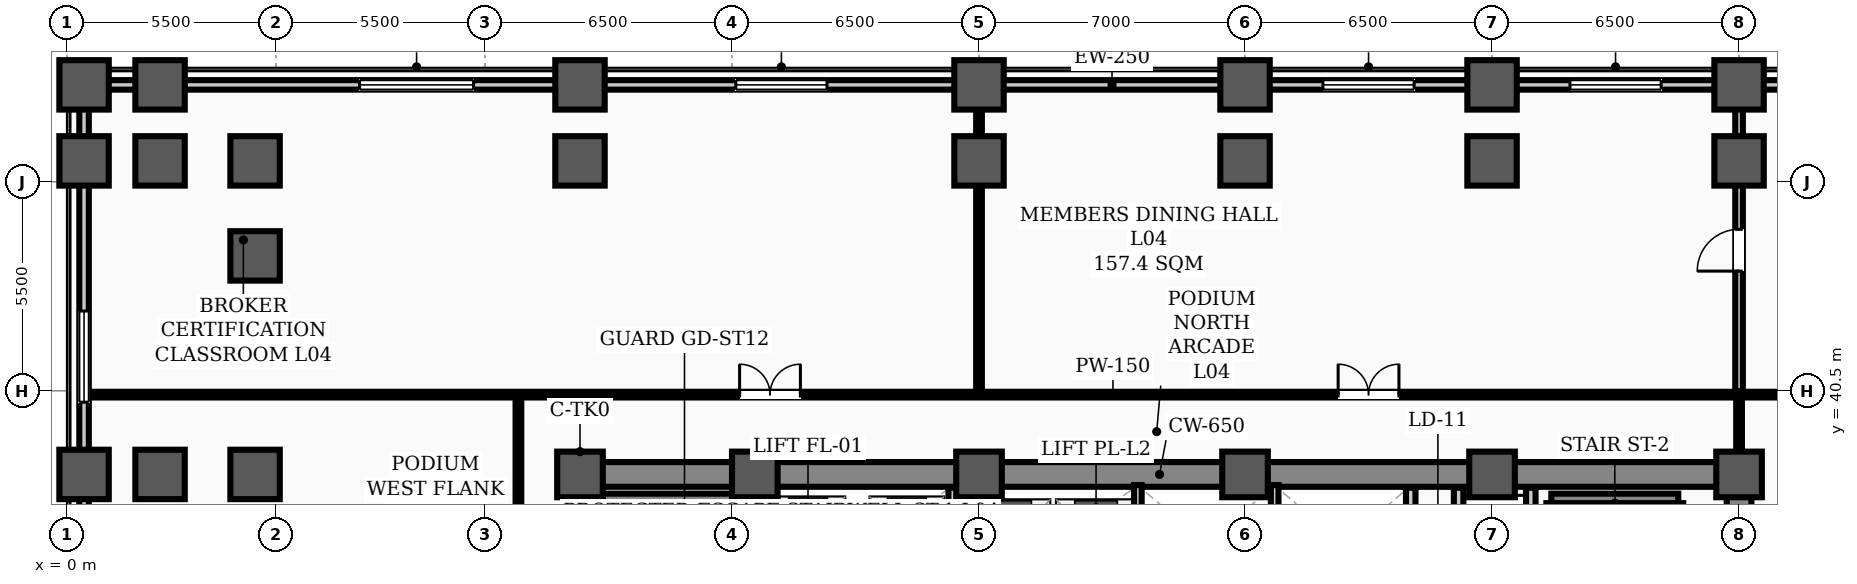
"""IFC4 building model, lengths in metres.
Left out: names, types, materials, properties, quantities, classifications, styles, units other than length and angle.
Written with IfcOpenShell. Run it as: python <this file> out.ifc"""

import sys

from ifc_helpers import new_model, si_unit, direction, frame, frame_2d, origin, origin_2d, place, context, subcontext, project, spatial, rectangle, hollow_rectangle, extrude, element, fill, save


model = new_model("IFC4")
c1 = context("Model", 3, precision=1e-05, world=origin(), true_north=direction((0.0, 1.0)))
c2 = subcontext(c1, "Body", "Model", "MODEL_VIEW")
j1 = project(units=[si_unit("LENGTHUNIT", "METRE"), si_unit("PLANEANGLEUNIT", "RADIAN")], contexts=[c1])
p1 = place(None, origin())
s1 = spatial("IfcSite", under=j1, at=p1, CompositionType="ELEMENT")
p2 = place(p1, origin())
s2 = spatial("IfcBuilding", under=s1, at=p2, CompositionType="ELEMENT")
p3 = place(p2, frame((0.0, 0.0, 16.6)))
s3 = spatial("IfcBuildingStorey", under=s2, at=p3, CompositionType="ELEMENT", Elevation=16.6)
for number, where, z_axis, x_axis in (
    (1, (13.5, 38.3, 0.0), (0.0, 0.0, 1.0), (1.0, 0.0, 0.0)),
    (2, (18.1, 38.3, 0.0), (0.0, 0.0, 1.0), (1.0, 0.0, 0.0)),
    (3, (24.0, 38.3, 0.0), (0.0, 0.0, 1.0), (1.0, 0.0, 0.0)),
    (4, (31.0, 38.3, 0.0), (0.0, 0.0, 1.0), (1.0, 0.0, 0.0)),
    (5, (37.5, 38.3, 0.0), (0.0, 0.0, 1.0), (1.0, 0.0, 0.0)),
    (6, (44.0, 38.3, 0.0), (0.0, 0.0, 1.0), (1.0, 0.0, 0.0)),
):
    element("IfcColumn", number, at=place(p3, frame(where, z_axis=z_axis, x_axis=x_axis)), inside=s3, PredefinedType="COLUMN", context=c2, shape_type="SweptSolid", body=[
        extrude(hollow_rectangle(XDim=1.2, YDim=1.2, WallThickness=0.04, InnerFilletRadius=0.02, OuterFilletRadius=0.06, at=origin_2d()), origin(), (0.0, 0.0, 1.0), 5.4),
    ])
for number, where, z_axis, x_axis in (
    (7, (0.45, 38.3, 0.0), (0.0, 0.0, 1.0), (1.0, 0.0, 0.0)),
    (8, (0.45, 46.55, 0.0), (0.0, 0.0, 1.0), (1.0, 0.0, 0.0)),
    (9, (0.45, 48.55, 0.0), (0.0, 0.0, 1.0), (1.0, 0.0, 0.0)),
):
    element("IfcColumn", number, at=place(p3, frame(where, z_axis=z_axis, x_axis=x_axis)), inside=s3, PredefinedType="COLUMN", context=c2, shape_type="SweptSolid", body=[
        extrude(rectangle(XDim=1.3, YDim=1.3, at=origin_2d()), origin(), (0.0, 0.0, 1.0), 5.16),
    ])
for number, where, z_axis, x_axis in (
    (10, (2.45, 38.3, 0.0), (0.0, 0.0, 1.0), (1.0, 0.0, 0.0)),
    (11, (2.45, 46.55, 0.0), (0.0, 0.0, 1.0), (1.0, 0.0, 0.0)),
):
    element("IfcColumn", number, at=place(p3, frame(where, z_axis=z_axis, x_axis=x_axis)), inside=s3, PredefinedType="COLUMN", context=c2, shape_type="SweptSolid", body=[
        extrude(rectangle(XDim=1.3, YDim=1.3, at=origin_2d()), origin(), (0.0, 0.0, 1.0), 5.4),
    ])
p4 = place(p3, frame((2.45, 48.55, 0.0), z_axis=(0.0, 0.0, 1.0), x_axis=(1.0, 0.0, 0.0)))
e12 = element("IfcColumn", 12, at=p4, inside=s3, PredefinedType="COLUMN", context=c2, shape_type="SweptSolid", body=[
    extrude(rectangle(XDim=1.3, YDim=1.3, at=origin_2d()), origin(), (0.0, 0.0, 1.0), 5.16),
])
for number, where, z_axis, x_axis in (
    (13, (4.95, 38.3, 0.0), (0.0, 0.0, 1.0), (1.0, 0.0, 0.0)),
    (14, (4.95, 44.05, 0.0), (0.0, 0.0, 1.0), (1.0, 0.0, 0.0)),
    (15, (4.95, 46.55, 0.0), (0.0, 0.0, 1.0), (1.0, 0.0, 0.0)),
    (16, (13.5, 46.55, 0.0), (0.0, 0.0, 1.0), (1.0, 0.0, 0.0)),
):
    element("IfcColumn", number, at=place(p3, frame(where, z_axis=z_axis, x_axis=x_axis)), inside=s3, PredefinedType="COLUMN", context=c2, shape_type="SweptSolid", body=[
        extrude(rectangle(XDim=1.3, YDim=1.3, at=origin_2d()), origin(), (0.0, 0.0, 1.0), 5.4),
    ])
p5 = place(p3, frame((13.5, 48.55, 0.0), z_axis=(0.0, 0.0, 1.0), x_axis=(1.0, 0.0, 0.0)))
e17 = element("IfcColumn", 17, at=p5, inside=s3, PredefinedType="COLUMN", context=c2, shape_type="SweptSolid", body=[
    extrude(rectangle(XDim=1.3, YDim=1.3, at=origin_2d()), origin(), (0.0, 0.0, 1.0), 5.16),
])
p6 = place(p3, frame((24.0, 46.55, 0.0), z_axis=(0.0, 0.0, 1.0), x_axis=(1.0, 0.0, 0.0)))
e18 = element("IfcColumn", 18, at=p6, inside=s3, PredefinedType="COLUMN", context=c2, shape_type="SweptSolid", body=[
    extrude(rectangle(XDim=1.3, YDim=1.3, at=origin_2d()), origin(), (0.0, 0.0, 1.0), 5.4),
])
p7 = place(p3, frame((24.0, 48.55, 0.0), z_axis=(0.0, 0.0, 1.0), x_axis=(1.0, 0.0, 0.0)))
e19 = element("IfcColumn", 19, at=p7, inside=s3, PredefinedType="COLUMN", context=c2, shape_type="SweptSolid", body=[
    extrude(rectangle(XDim=1.3, YDim=1.3, at=origin_2d()), origin(), (0.0, 0.0, 1.0), 5.16),
])
p8 = place(p3, frame((31.0, 46.55, 0.0), z_axis=(0.0, 0.0, 1.0), x_axis=(1.0, 0.0, 0.0)))
e20 = element("IfcColumn", 20, at=p8, inside=s3, PredefinedType="COLUMN", context=c2, shape_type="SweptSolid", body=[
    extrude(rectangle(XDim=1.3, YDim=1.3, at=origin_2d()), origin(), (0.0, 0.0, 1.0), 5.4),
])
p9 = place(p3, frame((31.0, 48.55, 0.0), z_axis=(0.0, 0.0, 1.0), x_axis=(1.0, 0.0, 0.0)))
e21 = element("IfcColumn", 21, at=p9, inside=s3, PredefinedType="COLUMN", context=c2, shape_type="SweptSolid", body=[
    extrude(rectangle(XDim=1.3, YDim=1.3, at=origin_2d()), origin(), (0.0, 0.0, 1.0), 5.16),
])
p10 = place(p3, frame((37.5, 46.55, 0.0), z_axis=(0.0, 0.0, 1.0), x_axis=(1.0, 0.0, 0.0)))
e22 = element("IfcColumn", 22, at=p10, inside=s3, PredefinedType="COLUMN", context=c2, shape_type="SweptSolid", body=[
    extrude(rectangle(XDim=1.3, YDim=1.3, at=origin_2d()), origin(), (0.0, 0.0, 1.0), 5.4),
])
p11 = place(p3, frame((37.5, 48.55, 0.0), z_axis=(0.0, 0.0, 1.0), x_axis=(1.0, 0.0, 0.0)))
e23 = element("IfcColumn", 23, at=p11, inside=s3, PredefinedType="COLUMN", context=c2, shape_type="SweptSolid", body=[
    extrude(rectangle(XDim=1.3, YDim=1.3, at=origin_2d()), origin(), (0.0, 0.0, 1.0), 5.16),
])
p12 = place(p3, frame((44.0, 46.55, 0.0), z_axis=(0.0, 0.0, 1.0), x_axis=(1.0, 0.0, 0.0)))
e24 = element("IfcColumn", 24, at=p12, inside=s3, PredefinedType="COLUMN", context=c2, shape_type="SweptSolid", body=[
    extrude(rectangle(XDim=1.3, YDim=1.3, at=origin_2d()), origin(), (0.0, 0.0, 1.0), 5.4),
])
p13 = place(p3, frame((44.0, 48.55, 0.0), z_axis=(0.0, 0.0, 1.0), x_axis=(1.0, 0.0, 0.0)))
e25 = element("IfcColumn", 25, at=p13, inside=s3, PredefinedType="COLUMN", context=c2, shape_type="SweptSolid", body=[
    extrude(rectangle(XDim=1.3, YDim=1.3, at=origin_2d()), origin(), (0.0, 0.0, 1.0), 5.16),
])
p14 = place(p3, frame((0.45, 48.55, 0.0), z_axis=(0.0, 0.0, 1.0), x_axis=(1.0, 0.0, 0.0)))
e26 = element("IfcWall", 26, at=p14, inside=s3, PredefinedType="STANDARD", context=c2, shape_type="SweptSolid", body=[
    extrude(rectangle(XDim=54.1, YDim=0.25, at=frame_2d((27.05, 0.0))), origin(), (0.0, 0.0, 1.0), 4.38),
])
p15 = place(p14, frame((7.25, 0.0, 0.9)))
e27 = element("IfcOpeningElement", 27, at=p15, cuts=e26, PredefinedType="OPENING", context=c2, shape_type="SweptSolid", body=[
    extrude(rectangle(XDim=3.0, YDim=2.2, at=frame_2d((1.5, 1.1))), frame((0.0, 0.135, 0.0), z_axis=(0.0, -1.0, 0.0), x_axis=(1.0, 0.0, 0.0)), (0.0, 0.0, 1.0), 0.27),
])
p16 = place(p14, frame((17.15, 0.0, 0.9)))
e28 = element("IfcOpeningElement", 28, at=p16, cuts=e26, PredefinedType="OPENING", context=c2, shape_type="SweptSolid", body=[
    extrude(rectangle(XDim=2.4, YDim=2.1, at=frame_2d((1.2, 1.05))), frame((0.0, 0.135, 0.0), z_axis=(0.0, -1.0, 0.0), x_axis=(1.0, 0.0, 0.0)), (0.0, 0.0, 1.0), 0.27),
])
p17 = place(p14, frame((32.6, 0.0, 0.9)))
e29 = element("IfcOpeningElement", 29, at=p17, cuts=e26, PredefinedType="OPENING", context=c2, shape_type="SweptSolid", body=[
    extrude(rectangle(XDim=2.4, YDim=2.1, at=frame_2d((1.2, 1.05))), frame((0.0, 0.135, 0.0), z_axis=(0.0, -1.0, 0.0), x_axis=(1.0, 0.0, 0.0)), (0.0, 0.0, 1.0), 0.27),
])
p18 = place(p14, frame((39.1, 0.0, 0.9)))
e30 = element("IfcOpeningElement", 30, at=p18, cuts=e26, PredefinedType="OPENING", context=c2, shape_type="SweptSolid", body=[
    extrude(rectangle(XDim=2.4, YDim=2.1, at=frame_2d((1.2, 1.05))), frame((0.0, 0.135, 0.0), z_axis=(0.0, -1.0, 0.0), x_axis=(1.0, 0.0, 0.0)), (0.0, 0.0, 1.0), 0.27),
])
p19 = place(p3, frame((0.45, 3.45, 0.0), z_axis=(0.0, 0.0, 1.0), x_axis=(0.0, 1.0, 0.0)))
e31 = element("IfcWall", 31, at=p19, inside=s3, PredefinedType="STANDARD", context=c2, shape_type="SweptSolid", body=[
    extrude(rectangle(XDim=45.1, YDim=0.25, at=frame_2d((22.55, 0.0))), origin(), (0.0, 0.0, 1.0), 4.38),
])
p20 = place(p19, frame((4.8, 0.0, 0.9)))
e32 = element("IfcOpeningElement", 32, at=p20, cuts=e31, PredefinedType="OPENING", context=c2, shape_type="SweptSolid", body=[
    extrude(rectangle(XDim=2.4, YDim=2.1, at=frame_2d((1.2, 1.05))), frame((0.0, 0.135, 0.0), z_axis=(0.0, -1.0, 0.0), x_axis=(1.0, 0.0, 0.0)), (0.0, 0.0, 1.0), 0.27),
])
p21 = place(p19, frame((19.85, 0.0, 0.9)))
e33 = element("IfcOpeningElement", 33, at=p21, cuts=e31, PredefinedType="OPENING", context=c2, shape_type="SweptSolid", body=[
    extrude(rectangle(XDim=2.4, YDim=2.1, at=frame_2d((1.2, 1.05))), frame((0.0, 0.135, 0.0), z_axis=(0.0, -1.0, 0.0), x_axis=(1.0, 0.0, 0.0)), (0.0, 0.0, 1.0), 0.27),
])
p22 = place(p19, frame((29.0, 0.0, 0.9)))
e34 = element("IfcOpeningElement", 34, at=p22, cuts=e31, PredefinedType="OPENING", context=c2, shape_type="SweptSolid", body=[
    extrude(rectangle(XDim=2.4, YDim=2.1, at=frame_2d((1.2, 1.05))), frame((0.0, 0.135, 0.0), z_axis=(0.0, -1.0, 0.0), x_axis=(1.0, 0.0, 0.0)), (0.0, 0.0, 1.0), 0.27),
])
p23 = place(p19, frame((36.75, 0.0, 0.9)))
e35 = element("IfcOpeningElement", 35, at=p23, cuts=e31, PredefinedType="OPENING", context=c2, shape_type="SweptSolid", body=[
    extrude(rectangle(XDim=2.4, YDim=2.1, at=frame_2d((1.2, 1.05))), frame((0.0, 0.135, 0.0), z_axis=(0.0, -1.0, 0.0), x_axis=(1.0, 0.0, 0.0)), (0.0, 0.0, 1.0), 0.27),
])
p24 = place(p3, frame((13.5, 38.3, 0.0), z_axis=(0.0, 0.0, 1.0), x_axis=(1.0, 0.0, 0.0)))
e36 = element("IfcWall", 36, at=p24, inside=s3, PredefinedType="SHEAR", context=c2, shape_type="SweptSolid", body=[
    extrude(rectangle(XDim=30.5, YDim=0.65, at=frame_2d((15.25, 0.0))), origin(), (0.0, 0.0, 1.0), 5.16),
])
for number, where, z_axis, x_axis in (
    (37, (13.5, 29.35, 0.0), (0.0, 0.0, 1.0), (0.0, 1.0, 0.0)),
    (38, (44.0, 29.35, 0.0), (0.0, 0.0, 1.0), (0.0, 1.0, 0.0)),
):
    element("IfcWall", number, at=place(p3, frame(where, z_axis=z_axis, x_axis=x_axis)), inside=s3, PredefinedType="SHEAR", context=c2, shape_type="SweptSolid", body=[
        extrude(rectangle(XDim=8.6, YDim=0.65, at=frame_2d((4.3, 0.0))), origin(), (0.0, 0.0, 1.0), 5.16),
    ])
p25 = place(p3, frame((14.1, 37.669, 0.0), z_axis=(0.0, 0.0, 1.0), x_axis=(1.0, 0.0, 0.0)))
e39 = element("IfcWall", 39, at=p25, inside=s3, PredefinedType="STANDARD", context=c2, shape_type="SweptSolid", body=[
    extrude(rectangle(XDim=3.67, YDim=0.25, at=frame_2d((1.835, 0.0))), origin(), (0.0, 0.0, 1.0), 5.16),
])
for number, where, z_axis, x_axis in (
    (40, (14.425, 30.36, 0.0), (0.0, 0.0, 1.0), (0.0, 1.0, 0.0)),
    (41, (17.775, 30.36, 0.0), (0.0, 0.0, 1.0), (0.0, 1.0, 0.0)),
):
    element("IfcWall", number, at=place(p3, frame(where, z_axis=z_axis, x_axis=x_axis)), inside=s3, PredefinedType="STANDARD", context=c2, shape_type="SweptSolid", body=[
        extrude(rectangle(XDim=7.184, YDim=0.25, at=frame_2d((3.592, 0.0))), origin(), (0.0, 0.0, 1.0), 5.16),
    ])
p26 = place(p3, frame((39.06, 37.669, 0.0), z_axis=(0.0, 0.0, 1.0), x_axis=(1.0, 0.0, 0.0)))
e42 = element("IfcWall", 42, at=p26, inside=s3, PredefinedType="STANDARD", context=c2, shape_type="SweptSolid", body=[
    extrude(rectangle(XDim=3.34, YDim=0.25, at=frame_2d((1.67, 0.0))), origin(), (0.0, 0.0, 1.0), 5.16),
])
for number, where, z_axis, x_axis in (
    (43, (39.055, 30.36, 0.0), (0.0, 0.0, 1.0), (0.0, 1.0, 0.0)),
    (44, (42.405, 30.36, 0.0), (0.0, 0.0, 1.0), (0.0, 1.0, 0.0)),
):
    element("IfcWall", number, at=place(p3, frame(where, z_axis=z_axis, x_axis=x_axis)), inside=s3, PredefinedType="STANDARD", context=c2, shape_type="SweptSolid", body=[
        extrude(rectangle(XDim=7.184, YDim=0.25, at=frame_2d((3.592, 0.0))), origin(), (0.0, 0.0, 1.0), 5.16),
    ])
p27 = place(p3, frame((36.62, 31.95, 0.0), z_axis=(0.0, 0.0, 1.0), x_axis=(0.0, 1.0, 0.0)))
e45 = element("IfcWall", 45, at=p27, inside=s3, PredefinedType="STANDARD", context=c2, shape_type="SweptSolid", body=[
    extrude(rectangle(XDim=6.0, YDim=0.25, at=frame_2d((3.0, 0.0))), origin(), (0.0, 0.0, 1.0), 3.74),
])
p28 = place(p27, frame((0.9, 0.0, 0.0)))
e46 = element("IfcOpeningElement", 46, at=p28, cuts=e45, PredefinedType="OPENING", context=c2, shape_type="SweptSolid", body=[
    extrude(rectangle(XDim=1.1, YDim=2.08, at=frame_2d((0.55, 1.04))), frame((0.0, 0.135, 0.0), z_axis=(0.0, -1.0, 0.0), x_axis=(1.0, 0.0, 0.0)), (0.0, 0.0, 1.0), 0.27),
])
p29 = place(p27, frame((4.0, 0.0, 0.0)))
e47 = element("IfcOpeningElement", 47, at=p29, cuts=e45, PredefinedType="OPENING", context=c2, shape_type="SweptSolid", body=[
    extrude(rectangle(XDim=1.1, YDim=2.08, at=frame_2d((0.55, 1.04))), frame((0.0, 0.135, 0.0), z_axis=(0.0, -1.0, 0.0), x_axis=(1.0, 0.0, 0.0)), (0.0, 0.0, 1.0), 0.27),
])
p30 = place(p3, frame((38.52, 31.95, 0.0), z_axis=(0.0, 0.0, 1.0), x_axis=(0.0, 1.0, 0.0)))
e48 = element("IfcWall", 48, at=p30, inside=s3, PredefinedType="STANDARD", context=c2, shape_type="SweptSolid", body=[
    extrude(rectangle(XDim=6.0, YDim=0.25, at=frame_2d((3.0, 0.0))), origin(), (0.0, 0.0, 1.0), 3.74),
])
for number, where, z_axis, x_axis in (
    (49, (18.28, 34.62, 0.0), (0.0, 0.0, 1.0), (0.0, 1.0, 0.0)),
    (50, (23.32, 34.62, 0.0), (0.0, 0.0, 1.0), (0.0, 1.0, 0.0)),
):
    element("IfcWall", number, at=place(p3, frame(where, z_axis=z_axis, x_axis=x_axis)), inside=s3, PredefinedType="STANDARD", context=c2, shape_type="SweptSolid", body=[
        extrude(rectangle(XDim=3.33, YDim=0.25, at=frame_2d((1.665, 0.0))), origin(), (0.0, 0.0, 1.0), 3.74),
    ])
p31 = place(p3, frame((35.36, 34.9, 0.0), z_axis=(0.0, 0.0, 1.0), x_axis=(0.0, 1.0, 0.0)))
e51 = element("IfcWall", 51, at=p31, inside=s3, PredefinedType="STANDARD", context=c2, shape_type="SweptSolid", body=[
    extrude(rectangle(XDim=3.05, YDim=0.25, at=frame_2d((1.525, 0.0))), origin(), (0.0, 0.0, 1.0), 3.74),
])
p32 = place(p3, frame((0.58, 40.4, 0.0), z_axis=(0.0, 0.0, 1.0), x_axis=(1.0, 0.0, 0.0)))
e52 = element("IfcWall", 52, at=p32, inside=s3, PredefinedType="PARTITIONING", context=c2, shape_type="SweptSolid", body=[
    extrude(rectangle(XDim=53.89, YDim=0.15, at=frame_2d((26.945, 0.0))), origin(), (0.0, 0.0, 1.0), 3.74),
])
p33 = place(p32, frame((17.12, 0.0, 0.0)))
e53 = element("IfcOpeningElement", 53, at=p33, cuts=e52, PredefinedType="OPENING", context=c2, shape_type="SweptSolid", body=[
    extrude(rectangle(XDim=1.6, YDim=2.08, at=frame_2d((0.8, 1.04))), frame((0.0, 0.085, 0.0), z_axis=(0.0, -1.0, 0.0), x_axis=(1.0, 0.0, 0.0)), (0.0, 0.0, 1.0), 0.17),
])
p34 = place(p32, frame((32.87, 0.0, 0.0)))
e54 = element("IfcOpeningElement", 54, at=p34, cuts=e52, PredefinedType="OPENING", context=c2, shape_type="SweptSolid", body=[
    extrude(rectangle(XDim=1.6, YDim=2.08, at=frame_2d((0.8, 1.04))), frame((0.0, 0.085, 0.0), z_axis=(0.0, -1.0, 0.0), x_axis=(1.0, 0.0, 0.0)), (0.0, 0.0, 1.0), 0.17),
])
p35 = place(p3, frame((11.88, 28.15, 0.0), z_axis=(0.0, 0.0, 1.0), x_axis=(0.0, 1.0, 0.0)))
e55 = element("IfcWall", 55, at=p35, inside=s3, PredefinedType="PARTITIONING", context=c2, shape_type="SweptSolid", body=[
    extrude(rectangle(XDim=12.165, YDim=0.15, at=frame_2d((6.083, 0.0))), origin(), (0.0, 0.0, 1.0), 3.74),
])
p36 = place(p3, frame((24.0, 40.485, 0.0), z_axis=(0.0, 0.0, 1.0), x_axis=(0.0, 1.0, 0.0)))
e56 = element("IfcWall", 56, at=p36, inside=s3, PredefinedType="PARTITIONING", context=c2, shape_type="SweptSolid", body=[
    extrude(rectangle(XDim=7.935, YDim=0.15, at=frame_2d((3.967, 0.0))), origin(), (0.0, 0.0, 1.0), 3.74),
])
p37 = place(p3, frame((44.0, 40.485, 0.0), z_axis=(0.0, 0.0, 1.0), x_axis=(0.0, 1.0, 0.0)))
e57 = element("IfcWall", 57, at=p37, inside=s3, PredefinedType="STANDARD", context=c2, shape_type="SweptSolid", body=[
    extrude(rectangle(XDim=7.935, YDim=0.2, at=frame_2d((3.967, 0.0))), origin(), (0.0, 0.0, 1.0), 3.74),
])
p38 = place(p37, frame((3.165, 0.0, 0.0)))
e58 = element("IfcOpeningElement", 58, at=p38, cuts=e57, PredefinedType="OPENING", context=c2, shape_type="SweptSolid", body=[
    extrude(rectangle(XDim=1.1, YDim=2.08, at=frame_2d((0.55, 1.04))), frame((0.0, 0.11, 0.0), z_axis=(0.0, -1.0, 0.0), x_axis=(1.0, 0.0, 0.0)), (0.0, 0.0, 1.0), 0.22),
])
p39 = place(p3, frame((44.0, 38.635, 0.0), z_axis=(0.0, 0.0, 1.0), x_axis=(0.0, 1.0, 0.0)))
e59 = element("IfcWall", 59, at=p39, inside=s3, PredefinedType="PARTITIONING", context=c2, shape_type="SweptSolid", body=[
    extrude(rectangle(XDim=1.68, YDim=0.15, at=frame_2d((0.84, 0.0))), origin(), (0.0, 0.0, 1.0), 3.74),
])
for number, where, z_axis, x_axis in (
    (60, (23.72, 34.9, 0.0), (0.0, 0.0, 1.0), (0.0, 1.0, 0.0)),
    (61, (28.18, 34.9, 0.0), (0.0, 0.0, 1.0), (0.0, 1.0, 0.0)),
    (62, (31.78, 34.9, 0.0), (0.0, 0.0, 1.0), (0.0, 1.0, 0.0)),
):
    element("IfcWall", number, at=place(p3, frame(where, z_axis=z_axis, x_axis=x_axis)), inside=s3, PredefinedType="STANDARD", context=c2, shape_type="SweptSolid", body=[
        extrude(rectangle(XDim=3.12, YDim=0.2, at=frame_2d((1.56, 0.0))), origin(), (0.0, 0.0, 1.0), 3.74),
    ])
p40 = place(p15, origin())
e63 = element("IfcWindow", 63, at=p40, inside=s3, PartitioningType="SINGLE_PANEL", PredefinedType="WINDOW", context=c2, shape_type="SweptSolid", body=[
    extrude(rectangle(XDim=3.0, YDim=2.2, at=frame_2d((1.5, 1.1))), frame((0.0, 0.03, 0.0), z_axis=(0.0, -1.0, 0.0), x_axis=(1.0, 0.0, 0.0)), (0.0, 0.0, 1.0), 0.06),
])
fill(e27, e63)
p41 = place(p16, origin())
e64 = element("IfcWindow", 64, at=p41, inside=s3, PartitioningType="SINGLE_PANEL", PredefinedType="WINDOW", context=c2, shape_type="SweptSolid", body=[
    extrude(rectangle(XDim=2.4, YDim=2.1, at=frame_2d((1.2, 1.05))), frame((0.0, 0.03, 0.0), z_axis=(0.0, -1.0, 0.0), x_axis=(1.0, 0.0, 0.0)), (0.0, 0.0, 1.0), 0.06),
])
fill(e28, e64)
p42 = place(p17, origin())
e65 = element("IfcWindow", 65, at=p42, inside=s3, PartitioningType="SINGLE_PANEL", PredefinedType="WINDOW", context=c2, shape_type="SweptSolid", body=[
    extrude(rectangle(XDim=2.4, YDim=2.1, at=frame_2d((1.2, 1.05))), frame((0.0, 0.03, 0.0), z_axis=(0.0, -1.0, 0.0), x_axis=(1.0, 0.0, 0.0)), (0.0, 0.0, 1.0), 0.06),
])
fill(e29, e65)
p43 = place(p18, origin())
e66 = element("IfcWindow", 66, at=p43, inside=s3, PartitioningType="SINGLE_PANEL", PredefinedType="WINDOW", context=c2, shape_type="SweptSolid", body=[
    extrude(rectangle(XDim=2.4, YDim=2.1, at=frame_2d((1.2, 1.05))), frame((0.0, 0.03, 0.0), z_axis=(0.0, -1.0, 0.0), x_axis=(1.0, 0.0, 0.0)), (0.0, 0.0, 1.0), 0.06),
])
fill(e30, e66)
p44 = place(p23, origin())
e67 = element("IfcWindow", 67, at=p44, inside=s3, PartitioningType="SINGLE_PANEL", PredefinedType="WINDOW", context=c2, shape_type="SweptSolid", body=[
    extrude(rectangle(XDim=2.4, YDim=2.1, at=frame_2d((1.2, 1.05))), frame((0.0, 0.03, 0.0), z_axis=(0.0, -1.0, 0.0), x_axis=(1.0, 0.0, 0.0)), (0.0, 0.0, 1.0), 0.06),
])
fill(e35, e67)
p45 = place(p33, origin())
e68 = element("IfcDoor", 68, at=p45, inside=s3, OperationType="DOUBLE_DOOR_SINGLE_SWING", PredefinedType="DOOR", context=c2, shape_type="SweptSolid", body=[
    extrude(rectangle(XDim=1.6, YDim=2.08, at=frame_2d((0.8, 1.04))), frame((0.0, 0.025, 0.0), z_axis=(0.0, -1.0, 0.0), x_axis=(1.0, 0.0, 0.0)), (0.0, 0.0, 1.0), 0.05),
])
fill(e53, e68)
p46 = place(p34, origin())
e69 = element("IfcDoor", 69, at=p46, inside=s3, OperationType="DOUBLE_DOOR_SINGLE_SWING", PredefinedType="DOOR", context=c2, shape_type="SweptSolid", body=[
    extrude(rectangle(XDim=1.6, YDim=2.08, at=frame_2d((0.8, 1.04))), frame((0.0, 0.025, 0.0), z_axis=(0.0, -1.0, 0.0), x_axis=(1.0, 0.0, 0.0)), (0.0, 0.0, 1.0), 0.05),
])
fill(e54, e69)
p47 = place(p38, origin())
e70 = element("IfcDoor", 70, at=p47, inside=s3, OperationType="SINGLE_SWING_LEFT", PredefinedType="DOOR", context=c2, shape_type="SweptSolid", body=[
    extrude(rectangle(XDim=1.1, YDim=2.08, at=frame_2d((0.55, 1.04))), frame((0.0, 0.025, 0.0), z_axis=(0.0, -1.0, 0.0), x_axis=(1.0, 0.0, 0.0)), (0.0, 0.0, 1.0), 0.05),
])
fill(e58, e70)
save(model, sys.argv[1])
